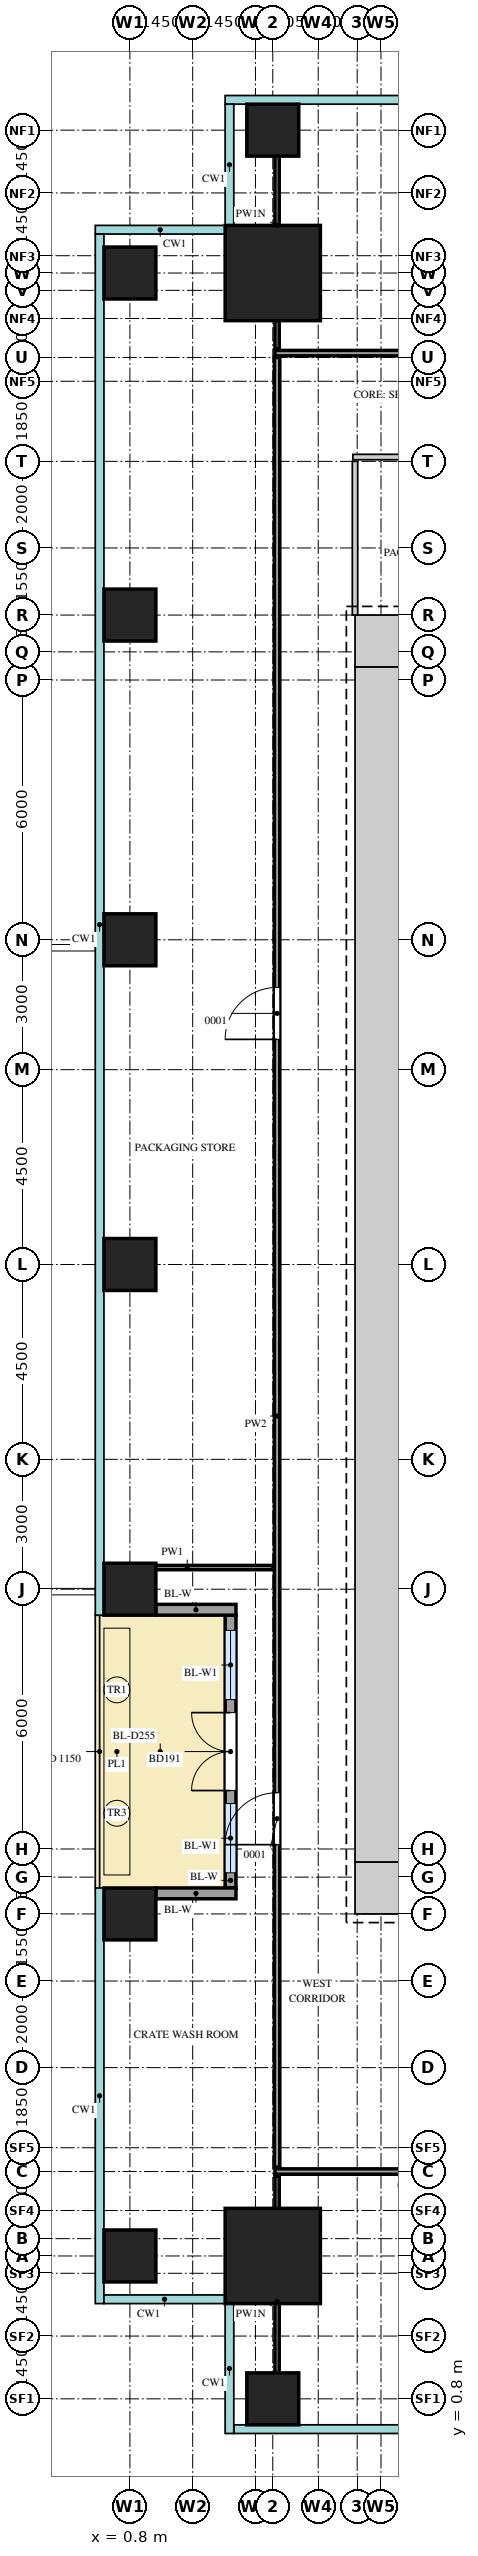
"""IFC4 building model, lengths in metres.
Left out: names, types, materials, properties, quantities, classifications, styles, units other than length and angle.
Written with IfcOpenShell. Run it as: python <this file> out.ifc"""

import sys

from ifc_helpers import new_model, si_unit, direction, frame, frame_2d, origin, origin_2d, place, context, subcontext, project, spatial, rectangle, extrude, source, transform, mapped, element, fill, save


model = new_model("IFC4")
c1 = context("Model", 3, precision=1e-05, world=origin(), true_north=direction((0.0, 1.0)))
c2 = subcontext(c1, "Body", "Model", "MODEL_VIEW")
j1 = project(units=[si_unit("LENGTHUNIT", "METRE"), si_unit("PLANEANGLEUNIT", "RADIAN")], contexts=[c1])
p1 = place(None, origin())
s1 = spatial("IfcSite", under=j1, at=p1, CompositionType="ELEMENT")
p2 = place(p1, origin())
s2 = spatial("IfcBuilding", under=s1, at=p2, CompositionType="ELEMENT")
p3 = place(p2, frame((0.0, 0.0, 91.5)))
s3 = spatial("IfcBuildingStorey", under=s2, at=p3, CompositionType="ELEMENT", Elevation=91.5)
m1 = source(origin(), c2, "Body", "SweptSolid", [
    extrude(rectangle(XDim=1.2, YDim=1.2, at=frame_2d((0.6, 0.0))), origin(), (0.0, 0.0, 1.0), 4.2),
])
for number, where, z_axis, x_axis in (
    (1, (6.0, 41.4, 0.0), (0.0, 0.0, 1.0), (1.0, 0.0, 0.0)),
    (2, (6.0, 12.6, 0.0), (0.0, 0.0, 1.0), (1.0, 0.0, 0.0)),
):
    element("IfcWall", number, at=place(p3, frame(where, z_axis=z_axis, x_axis=x_axis)), inside=s3, PredefinedType="SHEAR", context=c2, shape_type="MappedRepresentation", body=[
        mapped(m1, transform((0.0, 0.0, 0.0))),
    ])
m2 = source(origin(), c2, "Body", "SweptSolid", [
    extrude(rectangle(XDim=27.6, YDim=1.2, at=frame_2d((13.8, 0.0))), origin(), (0.0, 0.0, 1.0), 4.2),
])
p4 = place(p3, frame((6.6, 13.2, 0.0), z_axis=(0.0, 0.0, 1.0), x_axis=(0.0, 1.0, 0.0)))
e3 = element("IfcWall", 3, at=p4, inside=s3, PredefinedType="SHEAR", context=c2, shape_type="MappedRepresentation", body=[
    mapped(m2, transform((0.0, 0.0, 0.0))),
])
m3 = source(origin(), c2, "Body", "SweptSolid", [
    extrude(rectangle(XDim=2.2, YDim=2.2, at=origin_2d()), origin(), (0.0, 0.0, 1.0), 4.5),
])
for number, where, z_axis, x_axis in (
    (4, (4.1, 49.9, 0.0), (0.0, 0.0, 1.0), (1.0, 0.0, 0.0)),
    (5, (4.1, 4.1, 0.0), (0.0, 0.0, 1.0), (1.0, 0.0, 0.0)),
):
    element("IfcColumn", number, at=place(p3, frame(where, z_axis=z_axis, x_axis=x_axis)), inside=s3, PredefinedType="COLUMN", context=c2, shape_type="MappedRepresentation", body=[
        mapped(m3, transform((0.0, 0.0, 0.0))),
    ])
m4 = source(origin(), c2, "Body", "SweptSolid", [
    extrude(rectangle(XDim=1.2, YDim=1.2, at=origin_2d()), origin(), (0.0, 0.0, 1.0), 4.5),
])
for number, where, z_axis, x_axis in (
    (6, (4.1, 0.8, 0.0), (0.0, 0.0, 1.0), (1.0, 0.0, 0.0)),
    (7, (4.1, 53.2, 0.0), (0.0, 0.0, 1.0), (1.0, 0.0, 0.0)),
    (8, (0.8, 4.1, 0.0), (0.0, 0.0, 1.0), (1.0, 0.0, 0.0)),
    (9, (0.8, 12.0, 0.0), (0.0, 0.0, 1.0), (1.0, 0.0, 0.0)),
    (10, (0.8, 19.5, 0.0), (0.0, 0.0, 1.0), (1.0, 0.0, 0.0)),
    (11, (0.8, 27.0, 0.0), (0.0, 0.0, 1.0), (1.0, 0.0, 0.0)),
    (12, (0.8, 34.5, 0.0), (0.0, 0.0, 1.0), (1.0, 0.0, 0.0)),
    (13, (0.8, 42.0, 0.0), (0.0, 0.0, 1.0), (1.0, 0.0, 0.0)),
    (14, (0.8, 49.9, 0.0), (0.0, 0.0, 1.0), (1.0, 0.0, 0.0)),
):
    element("IfcColumn", number, at=place(p3, frame(where, z_axis=z_axis, x_axis=x_axis)), inside=s3, PredefinedType="COLUMN", context=c2, shape_type="MappedRepresentation", body=[
        mapped(m4, transform((0.0, 0.0, 0.0))),
    ])
m5 = source(origin(), c2, "Body", "SweptSolid", [
    extrude(rectangle(XDim=6.3, YDim=0.25, at=frame_2d((3.15, 0.0))), origin(), (0.0, 0.0, 1.0), 4.2),
])
p5 = place(p3, frame((3.125, 12.6, 0.0), z_axis=(0.0, 0.0, 1.0), x_axis=(0.0, 1.0, 0.0)))
e15 = element("IfcWall", 15, at=p5, inside=s3, PredefinedType="SOLIDWALL", context=c2, shape_type="MappedRepresentation", body=[
    mapped(m5, transform((0.0, 0.0, 0.0))),
])
m6 = source(origin(), c2, "Body", "SweptSolid", [
    extrude(rectangle(XDim=1.6, YDim=2.4, at=frame_2d((0.8, 1.2))), frame((0.0, 0.135, 0.0), z_axis=(0.0, -1.0, 0.0), x_axis=(1.0, 0.0, 0.0)), (0.0, 0.0, 1.0), 0.27),
])
p6 = place(p5, frame((0.35, 0.0, 0.0)))
e16 = element("IfcOpeningElement", 16, at=p6, cuts=e15, PredefinedType="OPENING", context=c2, shape_type="MappedRepresentation", body=[
    mapped(m6, transform((0.0, 0.0, 0.0))),
])
p7 = place(p5, frame((4.35, 0.0, 0.0)))
e17 = element("IfcOpeningElement", 17, at=p7, cuts=e15, PredefinedType="OPENING", context=c2, shape_type="MappedRepresentation", body=[
    mapped(m6, transform((0.0, 0.0, 0.0))),
])
m7 = source(origin(), c2, "Body", "SweptSolid", [
    extrude(rectangle(XDim=1.8, YDim=2.4, at=frame_2d((0.9, 1.2))), frame((0.0, 0.135, 0.0), z_axis=(0.0, -1.0, 0.0), x_axis=(1.0, 0.0, 0.0)), (0.0, 0.0, 1.0), 0.27),
])
p8 = place(p5, frame((2.25, 0.0, 0.0)))
e18 = element("IfcOpeningElement", 18, at=p8, cuts=e15, PredefinedType="OPENING", context=c2, shape_type="MappedRepresentation", body=[
    mapped(m7, transform((0.0, 0.0, 0.0))),
])
m8 = source(origin(), c2, "Body", "SweptSolid", [
    extrude(rectangle(XDim=1.85, YDim=0.25, at=frame_2d((0.925, 0.0))), origin(), (0.0, 0.0, 1.0), 4.2),
])
for number, where, z_axis, x_axis in (
    (19, (1.4, 12.475, 0.0), (0.0, 0.0, 1.0), (1.0, 0.0, 0.0)),
    (20, (1.4, 19.025, 0.0), (0.0, 0.0, 1.0), (1.0, 0.0, 0.0)),
):
    element("IfcWall", number, at=place(p3, frame(where, z_axis=z_axis, x_axis=x_axis)), inside=s3, PredefinedType="SOLIDWALL", context=c2, shape_type="MappedRepresentation", body=[
        mapped(m8, transform((0.0, 0.0, 0.0))),
    ])
m9 = source(origin(), c2, "Body", "SweptSolid", [
    extrude(rectangle(XDim=5.8, YDim=0.1, at=frame_2d((2.9, 0.0))), origin(), (0.0, 0.0, 1.0), 3.5),
])
p9 = place(p3, frame((4.2, 0.15, 0.0), z_axis=(0.0, 0.0, 1.0), x_axis=(0.0, 1.0, 0.0)))
e21 = element("IfcWall", 21, at=p9, inside=s3, PredefinedType="PARTITIONING", context=c2, shape_type="MappedRepresentation", body=[
    mapped(m9, transform((0.0, 0.0, 0.0))),
])
m10 = source(origin(), c2, "Body", "SweptSolid", [
    extrude(rectangle(XDim=22.3, YDim=0.125, at=frame_2d((11.15, 0.0))), origin(), (0.0, 0.0, 1.0), 4.3),
])
p10 = place(p3, frame((4.15, 6.05, 0.0), z_axis=(0.0, 0.0, 1.0), x_axis=(1.0, 0.0, 0.0)))
e22 = element("IfcWall", 22, at=p10, inside=s3, PredefinedType="PARTITIONING", context=c2, shape_type="MappedRepresentation", body=[
    mapped(m10, transform((0.0, 0.0, 0.0))),
])
m11 = source(origin(), c2, "Body", "SweptSolid", [
    extrude(rectangle(XDim=0.9, YDim=2.1, at=frame_2d((0.45, 1.05))), frame((0.0, 0.073, 0.0), z_axis=(0.0, -1.0, 0.0), x_axis=(1.0, 0.0, 0.0)), (0.0, 0.0, 1.0), 0.145),
])
p11 = place(p10, frame((3.5, 0.0, 0.0)))
e23 = element("IfcOpeningElement", 23, at=p11, cuts=e22, PredefinedType="OPENING", context=c2, shape_type="MappedRepresentation", body=[
    mapped(m11, transform((0.0, 0.0, 0.0))),
])
p12 = place(p10, frame((13.25, 0.0, 0.0)))
e24 = element("IfcOpeningElement", 24, at=p12, cuts=e22, PredefinedType="OPENING", context=c2, shape_type="MappedRepresentation", body=[
    mapped(m11, transform((0.0, 0.0, 0.0))),
])
m12 = source(origin(), c2, "Body", "SweptSolid", [
    extrude(rectangle(XDim=41.8, YDim=0.125, at=frame_2d((20.9, 0.0))), origin(), (0.0, 0.0, 1.0), 4.3),
])
p13 = place(p3, frame((4.2, 6.15, 0.0), z_axis=(0.0, 0.0, 1.0), x_axis=(0.0, 1.0, 0.0)))
e25 = element("IfcWall", 25, at=p13, inside=s3, PredefinedType="PARTITIONING", context=c2, shape_type="MappedRepresentation", body=[
    mapped(m12, transform((0.0, 0.0, 0.0))),
])
m13 = source(origin(), c2, "Body", "SweptSolid", [
    extrude(rectangle(XDim=1.2, YDim=2.1, at=frame_2d((0.6, 1.05))), frame((0.0, 0.073, 0.0), z_axis=(0.0, -1.0, 0.0), x_axis=(1.0, 0.0, 0.0)), (0.0, 0.0, 1.0), 0.145),
])
p14 = place(p13, frame((7.45, 0.0, 0.0)))
e26 = element("IfcOpeningElement", 26, at=p14, cuts=e25, PredefinedType="OPENING", context=c2, shape_type="MappedRepresentation", body=[
    mapped(m13, transform((0.0, 0.0, 0.0))),
])
p15 = place(p13, frame((26.05, 0.0, 0.0)))
e27 = element("IfcOpeningElement", 27, at=p15, cuts=e25, PredefinedType="OPENING", context=c2, shape_type="MappedRepresentation", body=[
    mapped(m13, transform((0.0, 0.0, 0.0))),
])
m14 = source(origin(), c2, "Body", "SweptSolid", [
    extrude(rectangle(XDim=3.95, YDim=0.1, at=frame_2d((1.975, 0.0))), origin(), (0.0, 0.0, 1.0), 4.3),
])
p16 = place(p3, frame((0.15, 20.0, 0.0), z_axis=(0.0, 0.0, 1.0), x_axis=(1.0, 0.0, 0.0)))
e28 = element("IfcWall", 28, at=p16, inside=s3, PredefinedType="PARTITIONING", context=c2, shape_type="MappedRepresentation", body=[
    mapped(m14, transform((0.0, 0.0, 0.0))),
])
m15 = source(origin(), c2, "Body", "SweptSolid", [
    extrude(rectangle(XDim=3.55, YDim=0.125, at=frame_2d((1.775, 0.0))), origin(), (0.0, 0.0, 1.0), 4.3),
])
p17 = place(p3, frame((6.0, 42.0, 0.0), z_axis=(0.0, 0.0, 1.0), x_axis=(0.0, 1.0, 0.0)))
e29 = element("IfcWall", 29, at=p17, inside=s3, PredefinedType="PARTITIONING", context=c2, shape_type="MappedRepresentation", body=[
    mapped(m15, transform((0.0, 0.0, 0.0))),
])
m16 = source(origin(), c2, "Body", "SweptSolid", [
    extrude(rectangle(XDim=7.95, YDim=0.125, at=frame_2d((3.975, 0.0))), origin(), (0.0, 0.0, 1.0), 4.3),
])
p18 = place(p3, frame((5.95, 45.65, 0.0), z_axis=(0.0, 0.0, 1.0), x_axis=(1.0, 0.0, 0.0)))
e30 = element("IfcWall", 30, at=p18, inside=s3, PredefinedType="PARTITIONING", context=c2, shape_type="MappedRepresentation", body=[
    mapped(m16, transform((0.0, 0.0, 0.0))),
])
p19 = place(p18, frame((1.55, 0.0, 0.0)))
e31 = element("IfcOpeningElement", 31, at=p19, cuts=e30, PredefinedType="OPENING", context=c2, shape_type="MappedRepresentation", body=[
    mapped(m11, transform((0.0, 0.0, 0.0))),
])
p20 = place(p18, frame((5.65, 0.0, 0.0)))
e32 = element("IfcOpeningElement", 32, at=p20, cuts=e30, PredefinedType="OPENING", context=c2, shape_type="MappedRepresentation", body=[
    mapped(m11, transform((0.0, 0.0, 0.0))),
])
m17 = source(origin(), c2, "Body", "SweptSolid", [
    extrude(rectangle(XDim=26.6, YDim=0.125, at=frame_2d((13.3, 0.0))), origin(), (0.0, 0.0, 1.0), 4.3),
])
p21 = place(p3, frame((4.15, 48.05, 0.0), z_axis=(0.0, 0.0, 1.0), x_axis=(1.0, 0.0, 0.0)))
e33 = element("IfcWall", 33, at=p21, inside=s3, PredefinedType="PARTITIONING", context=c2, shape_type="MappedRepresentation", body=[
    mapped(m17, transform((0.0, 0.0, 0.0))),
])
p22 = place(p21, frame((7.25, 0.0, 0.0)))
e34 = element("IfcOpeningElement", 34, at=p22, cuts=e33, PredefinedType="OPENING", context=c2, shape_type="MappedRepresentation", body=[
    mapped(m11, transform((0.0, 0.0, 0.0))),
])
p23 = place(p21, frame((20.5, 0.0, 0.0)))
e35 = element("IfcOpeningElement", 35, at=p23, cuts=e33, PredefinedType="OPENING", context=c2, shape_type="MappedRepresentation", body=[
    mapped(m11, transform((0.0, 0.0, 0.0))),
])
m18 = source(origin(), c2, "Body", "SweptSolid", [
    extrude(rectangle(XDim=5.7, YDim=0.1, at=frame_2d((2.85, 0.0))), origin(), (0.0, 0.0, 1.0), 3.5),
])
p24 = place(p3, frame((4.2, 48.15, 0.0), z_axis=(0.0, 0.0, 1.0), x_axis=(0.0, 1.0, 0.0)))
e36 = element("IfcWall", 36, at=p24, inside=s3, PredefinedType="PARTITIONING", context=c2, shape_type="MappedRepresentation", body=[
    mapped(m18, transform((0.0, 0.0, 0.0))),
])
m19 = source(origin(), c2, "Body", "SweptSolid", [
    extrude(rectangle(XDim=1.6, YDim=2.4, at=frame_2d((0.8, 1.2))), frame((0.0, 0.03, 0.0), z_axis=(0.0, -1.0, 0.0), x_axis=(1.0, 0.0, 0.0)), (0.0, 0.0, 1.0), 0.06),
])
p25 = place(p6, origin())
e37 = element("IfcWindow", 37, at=p25, inside=s3, PartitioningType="SINGLE_PANEL", PredefinedType="WINDOW", context=c2, shape_type="MappedRepresentation", body=[
    mapped(m19, transform((0.0, 0.0, 0.0))),
])
fill(e16, e37)
p26 = place(p7, origin())
e38 = element("IfcWindow", 38, at=p26, inside=s3, PartitioningType="SINGLE_PANEL", PredefinedType="WINDOW", context=c2, shape_type="MappedRepresentation", body=[
    mapped(m19, transform((0.0, 0.0, 0.0))),
])
fill(e17, e38)
m20 = source(origin(), c2, "Body", "SweptSolid", [
    extrude(rectangle(XDim=1.8, YDim=2.4, at=frame_2d((0.9, 1.2))), frame((0.0, 0.025, 0.0), z_axis=(0.0, -1.0, 0.0), x_axis=(1.0, 0.0, 0.0)), (0.0, 0.0, 1.0), 0.05),
])
p27 = place(p8, origin())
e39 = element("IfcDoor", 39, at=p27, inside=s3, OperationType="DOUBLE_DOOR_DOUBLE_SWING", PredefinedType="DOOR", context=c2, shape_type="MappedRepresentation", body=[
    mapped(m20, transform((0.0, 0.0, 0.0))),
])
fill(e18, e39)
m21 = source(origin(), c2, "Body", "SweptSolid", [
    extrude(rectangle(XDim=1.2, YDim=2.1, at=frame_2d((0.6, 1.05))), frame((0.0, 0.025, 0.0), z_axis=(0.0, -1.0, 0.0), x_axis=(1.0, 0.0, 0.0)), (0.0, 0.0, 1.0), 0.05),
])
p28 = place(p14, origin())
e40 = element("IfcDoor", 40, at=p28, inside=s3, OperationType="SINGLE_SWING_RIGHT", PredefinedType="DOOR", context=c2, shape_type="MappedRepresentation", body=[
    mapped(m21, transform((0.0, 0.0, 0.0))),
])
fill(e26, e40)
p29 = place(p15, origin())
e41 = element("IfcDoor", 41, at=p29, inside=s3, OperationType="SINGLE_SWING_RIGHT", PredefinedType="DOOR", context=c2, shape_type="MappedRepresentation", body=[
    mapped(m21, transform((0.0, 0.0, 0.0))),
])
fill(e27, e41)
save(model, sys.argv[1])
